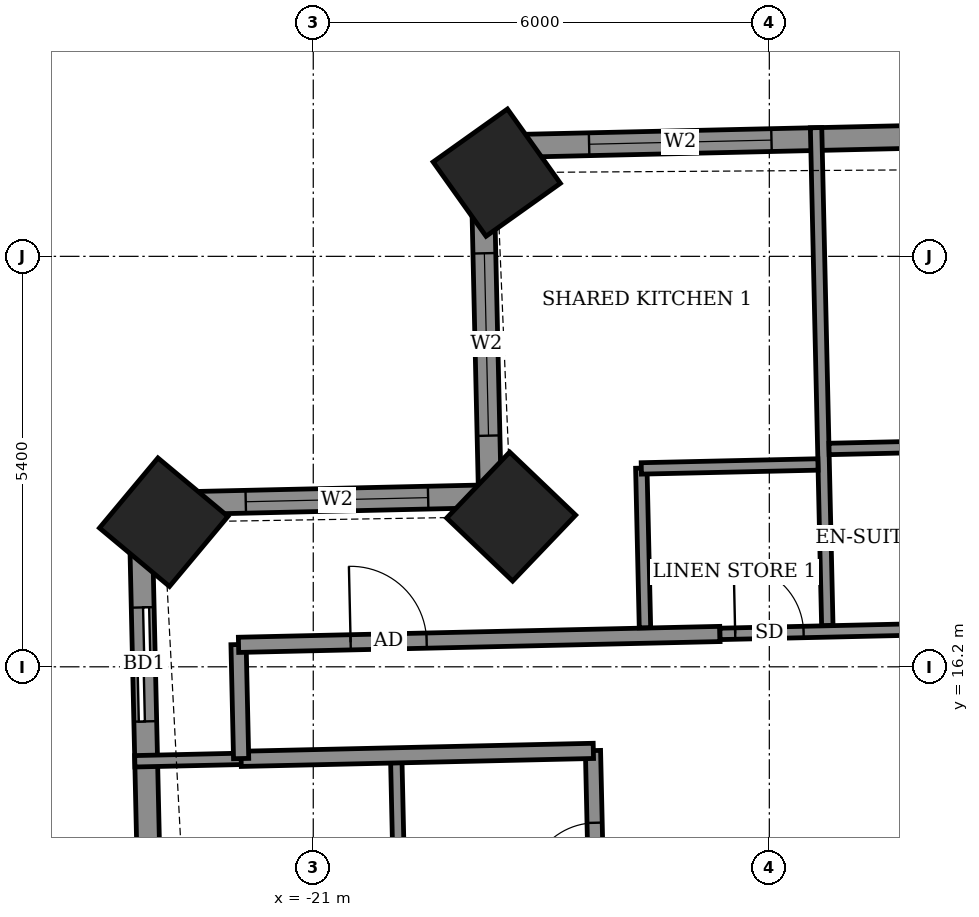
"""IFC4 building model, lengths in metres.
Left out: names, types, materials, properties, quantities, classifications, styles, units other than length and angle.
Written with IfcOpenShell. Run it as: python <this file> out.ifc"""

import sys

from ifc_helpers import new_model, si_unit, direction, frame, frame_2d, origin, origin_2d, place, context, subcontext, project, spatial, rectangle, extrude, element, fill, save


model = new_model("IFC4")
c1 = context("Model", 3, precision=1e-05, world=origin(), true_north=direction((0.0, 1.0)))
c2 = subcontext(c1, "Body", "Model", "MODEL_VIEW")
j1 = project(units=[si_unit("LENGTHUNIT", "METRE"), si_unit("PLANEANGLEUNIT", "RADIAN")], contexts=[c1])
p1 = place(None, origin())
s1 = spatial("IfcSite", under=j1, at=p1, CompositionType="ELEMENT")
p2 = place(p1, origin())
s2 = spatial("IfcBuilding", under=s1, at=p2, CompositionType="ELEMENT")
p3 = place(p2, frame((0.0, 0.0, 182.5)))
s3 = spatial("IfcBuildingStorey", under=s2, at=p3, CompositionType="ELEMENT", Elevation=182.5)
for number, where, z_axis, x_axis in (
    (1, (-18.586, 22.701, -0.55), (0.0, 0.0, 1.0), (-0.815, -0.58, 0.0)),
    (2, (-18.396, 18.177, -0.55), (0.0, 0.0, 1.0), (-0.691, -0.723, 0.0)),
    (3, (-22.968, 18.103, -0.55), (0.0, 0.0, 1.0), (-0.641, -0.768, 0.0)),
):
    element("IfcColumn", number, at=place(p3, frame(where, z_axis=z_axis, x_axis=x_axis)), inside=s3, PredefinedType="COLUMN", context=c2, shape_type="SweptSolid", body=[
        extrude(rectangle(XDim=1.2, YDim=1.2, at=origin_2d()), origin(), (0.0, 0.0, 1.0), 3.6),
    ])
p4 = place(p3, frame((21.589, 23.959, 0.0), z_axis=(0.0, 0.0, 1.0), x_axis=(-0.999742671382, -0.022684598702, 0.0)))
e4 = element("IfcWall", 4, at=p4, inside=s3, PredefinedType="SOLIDWALL", context=c2, shape_type="SweptSolid", body=[
    extrude(rectangle(XDim=40.381, YDim=0.3, at=frame_2d((20.19, 0.0))), origin(), (0.0, 0.0, 1.0), 3.05),
])
p5 = place(p4, frame((1.853, 0.0, 0.0)))
e5 = element("IfcOpeningElement", 5, at=p5, cuts=e4, PredefinedType="OPENING", context=c2, shape_type="SweptSolid", body=[
    extrude(rectangle(XDim=1.5, YDim=2.4, at=frame_2d((0.75, 1.2))), frame((0.0, 0.16, 0.0), z_axis=(0.0, -1.0, 0.0), x_axis=(1.0, 0.0, 0.0)), (0.0, 0.0, 1.0), 0.32),
])
p6 = place(p4, frame((7.38, 0.0, 0.0)))
e6 = element("IfcOpeningElement", 6, at=p6, cuts=e4, PredefinedType="OPENING", context=c2, shape_type="SweptSolid", body=[
    extrude(rectangle(XDim=1.2, YDim=2.4, at=frame_2d((0.6, 1.2))), frame((0.0, 0.16, 0.0), z_axis=(0.0, -1.0, 0.0), x_axis=(1.0, 0.0, 0.0)), (0.0, 0.0, 1.0), 0.32),
])
p7 = place(p4, frame((10.27, 0.0, 0.0)))
e7 = element("IfcOpeningElement", 7, at=p7, cuts=e4, PredefinedType="OPENING", context=c2, shape_type="SweptSolid", body=[
    extrude(rectangle(XDim=1.5, YDim=2.4, at=frame_2d((0.75, 1.2))), frame((0.0, 0.16, 0.0), z_axis=(0.0, -1.0, 0.0), x_axis=(1.0, 0.0, 0.0)), (0.0, 0.0, 1.0), 0.32),
])
p8 = place(p4, frame((15.095, 0.0, 0.0)))
e8 = element("IfcOpeningElement", 8, at=p8, cuts=e4, PredefinedType="OPENING", context=c2, shape_type="SweptSolid", body=[
    extrude(rectangle(XDim=1.5, YDim=2.4, at=frame_2d((0.75, 1.2))), frame((0.0, 0.16, 0.0), z_axis=(0.0, -1.0, 0.0), x_axis=(1.0, 0.0, 0.0)), (0.0, 0.0, 1.0), 0.32),
])
p9 = place(p4, frame((20.935, 0.0, 0.0)))
e9 = element("IfcOpeningElement", 9, at=p9, cuts=e4, PredefinedType="OPENING", context=c2, shape_type="SweptSolid", body=[
    extrude(rectangle(XDim=1.2, YDim=2.4, at=frame_2d((0.6, 1.2))), frame((0.0, 0.16, 0.0), z_axis=(0.0, -1.0, 0.0), x_axis=(1.0, 0.0, 0.0)), (0.0, 0.0, 1.0), 0.32),
])
p10 = place(p4, frame((23.825, 0.0, 0.0)))
e10 = element("IfcOpeningElement", 10, at=p10, cuts=e4, PredefinedType="OPENING", context=c2, shape_type="SweptSolid", body=[
    extrude(rectangle(XDim=1.5, YDim=2.4, at=frame_2d((0.75, 1.2))), frame((0.0, 0.16, 0.0), z_axis=(0.0, -1.0, 0.0), x_axis=(1.0, 0.0, 0.0)), (0.0, 0.0, 1.0), 0.32),
])
p11 = place(p4, frame((28.65, 0.0, 0.0)))
e11 = element("IfcOpeningElement", 11, at=p11, cuts=e4, PredefinedType="OPENING", context=c2, shape_type="SweptSolid", body=[
    extrude(rectangle(XDim=1.5, YDim=2.4, at=frame_2d((0.75, 1.2))), frame((0.0, 0.16, 0.0), z_axis=(0.0, -1.0, 0.0), x_axis=(1.0, 0.0, 0.0)), (0.0, 0.0, 1.0), 0.32),
])
p12 = place(p4, frame((31.84, 0.0, 0.0)))
e12 = element("IfcOpeningElement", 12, at=p12, cuts=e4, PredefinedType="OPENING", context=c2, shape_type="SweptSolid", body=[
    extrude(rectangle(XDim=1.2, YDim=2.4, at=frame_2d((0.6, 1.2))), frame((0.0, 0.16, 0.0), z_axis=(0.0, -1.0, 0.0), x_axis=(1.0, 0.0, 0.0)), (0.0, 0.0, 1.0), 0.32),
])
p13 = place(p4, frame((36.57, 0.0, 0.9)))
e13 = element("IfcOpeningElement", 13, at=p13, cuts=e4, PredefinedType="OPENING", context=c2, shape_type="SweptSolid", body=[
    extrude(rectangle(XDim=2.4, YDim=1.5, at=frame_2d((1.2, 0.75))), frame((0.0, 0.16, 0.0), z_axis=(0.0, -1.0, 0.0), x_axis=(1.0, 0.0, 0.0)), (0.0, 0.0, 1.0), 0.32),
])
p14 = place(p3, frame((-18.781, 23.043, 0.0), z_axis=(0.0, 0.0, 1.0), x_axis=(0.022821468877, -0.999739556364, 0.0)))
e14 = element("IfcWall", 14, at=p14, inside=s3, PredefinedType="SOLIDWALL", context=c2, shape_type="SweptSolid", body=[
    extrude(rectangle(XDim=4.6, YDim=0.3, at=frame_2d((2.3, 0.0))), origin(), (0.0, 0.0, 1.0), 2.55),
])
p15 = place(p14, frame((1.403, 0.0, 0.9)))
e15 = element("IfcOpeningElement", 15, at=p15, cuts=e14, PredefinedType="OPENING", context=c2, shape_type="SweptSolid", body=[
    extrude(rectangle(XDim=2.4, YDim=1.5, at=frame_2d((1.2, 0.75))), frame((0.0, 0.16, 0.0), z_axis=(0.0, -1.0, 0.0), x_axis=(1.0, 0.0, 0.0)), (0.0, 0.0, 1.0), 0.32),
])
p16 = place(p3, frame((-18.676, 18.444, 0.0), z_axis=(0.0, 0.0, 1.0), x_axis=(-0.999744377441, -0.022609285172, 0.0)))
e16 = element("IfcWall", 16, at=p16, inside=s3, PredefinedType="SOLIDWALL", context=c2, shape_type="SweptSolid", body=[
    extrude(rectangle(XDim=4.6, YDim=0.3, at=frame_2d((2.3, 0.0))), origin(), (0.0, 0.0, 1.0), 2.55),
])
p17 = place(p16, frame((0.813, 0.0, 0.9)))
e17 = element("IfcOpeningElement", 17, at=p17, cuts=e16, PredefinedType="OPENING", context=c2, shape_type="SweptSolid", body=[
    extrude(rectangle(XDim=2.4, YDim=1.5, at=frame_2d((1.2, 0.75))), frame((0.0, 0.16, 0.0), z_axis=(0.0, -1.0, 0.0), x_axis=(1.0, 0.0, 0.0)), (0.0, 0.0, 1.0), 0.32),
])
p18 = place(p3, frame((-23.275, 18.34, 0.0), z_axis=(0.0, 0.0, 1.0), x_axis=(0.022705985163, -0.999742185885, 0.0)))
e18 = element("IfcWall", 18, at=p18, inside=s3, PredefinedType="SOLIDWALL", context=c2, shape_type="SweptSolid", body=[
    extrude(rectangle(XDim=10.43, YDim=0.3, at=frame_2d((5.215, 0.0))), origin(), (0.0, 0.0, 1.0), 3.05),
])
p19 = place(p18, frame((1.359, 0.0, 0.0)))
e19 = element("IfcOpeningElement", 19, at=p19, cuts=e18, PredefinedType="OPENING", context=c2, shape_type="SweptSolid", body=[
    extrude(rectangle(XDim=1.5, YDim=2.4, at=frame_2d((0.75, 1.2))), frame((0.0, 0.16, 0.0), z_axis=(0.0, -1.0, 0.0), x_axis=(1.0, 0.0, 0.0)), (0.0, 0.0, 1.0), 0.32),
])
p20 = place(p18, frame((6.543, 0.0, 0.9)))
e20 = element("IfcOpeningElement", 20, at=p20, cuts=e18, PredefinedType="OPENING", context=c2, shape_type="SweptSolid", body=[
    extrude(rectangle(XDim=2.4, YDim=1.5, at=frame_2d((1.2, 0.75))), frame((0.0, 0.16, 0.0), z_axis=(0.0, -1.0, 0.0), x_axis=(1.0, 0.0, 0.0)), (0.0, 0.0, 1.0), 0.32),
])
p21 = place(p3, frame((-16.684, -12.919, 0.0), z_axis=(0.0, 0.0, 1.0), x_axis=(-0.022694293906, 0.999742451346, 0.0)))
e21 = element("IfcWall", 21, at=p21, inside=s3, PredefinedType="PARTITIONING", context=c2, shape_type="SweptSolid", body=[
    extrude(rectangle(XDim=28.024, YDim=0.2, at=frame_2d((14.012, 0.0))), origin(), (0.0, 0.0, 1.0), 3.05),
])
p22 = place(p21, frame((22.625, 0.0, 0.0)))
e22 = element("IfcOpeningElement", 22, at=p22, cuts=e21, PredefinedType="OPENING", context=c2, shape_type="SweptSolid", body=[
    extrude(rectangle(XDim=1.0, YDim=2.1, at=frame_2d((0.5, 1.05))), frame((0.0, 0.11, 0.0), z_axis=(0.0, -1.0, 0.0), x_axis=(1.0, 0.0, 0.0)), (0.0, 0.0, 1.0), 0.22),
])
p23 = place(p21, frame((26.174, 0.0, 0.0)))
e23 = element("IfcOpeningElement", 23, at=p23, cuts=e21, PredefinedType="OPENING", context=c2, shape_type="SweptSolid", body=[
    extrude(rectangle(XDim=0.9, YDim=2.1, at=frame_2d((0.45, 1.05))), frame((0.0, 0.11, 0.0), z_axis=(0.0, -1.0, 0.0), x_axis=(1.0, 0.0, 0.0)), (0.0, 0.0, 1.0), 0.22),
])
p24 = place(p21, frame((16.432, 0.0, 0.0)))
e24 = element("IfcOpeningElement", 24, at=p24, cuts=e21, PredefinedType="OPENING", context=c2, shape_type="SweptSolid", body=[
    extrude(rectangle(XDim=1.0, YDim=2.1, at=frame_2d((0.5, 1.05))), frame((0.0, 0.11, 0.0), z_axis=(0.0, -1.0, 0.0), x_axis=(1.0, 0.0, 0.0)), (0.0, 0.0, 1.0), 0.22),
])
p25 = place(p21, frame((10.975, 0.0, 0.0)))
e25 = element("IfcOpeningElement", 25, at=p25, cuts=e21, PredefinedType="OPENING", context=c2, shape_type="SweptSolid", body=[
    extrude(rectangle(XDim=1.0, YDim=2.1, at=frame_2d((0.5, 1.05))), frame((0.0, 0.11, 0.0), z_axis=(0.0, -1.0, 0.0), x_axis=(1.0, 0.0, 0.0)), (0.0, 0.0, 1.0), 0.22),
])
p26 = place(p21, frame((8.025, 0.0, 0.0)))
e26 = element("IfcOpeningElement", 26, at=p26, cuts=e21, PredefinedType="OPENING", context=c2, shape_type="SweptSolid", body=[
    extrude(rectangle(XDim=0.9, YDim=2.1, at=frame_2d((0.45, 1.05))), frame((0.0, 0.11, 0.0), z_axis=(0.0, -1.0, 0.0), x_axis=(1.0, 0.0, 0.0)), (0.0, 0.0, 1.0), 0.22),
])
p27 = place(p21, frame((5.113, 0.0, 0.0)))
e27 = element("IfcOpeningElement", 27, at=p27, cuts=e21, PredefinedType="OPENING", context=c2, shape_type="SweptSolid", body=[
    extrude(rectangle(XDim=1.0, YDim=2.1, at=frame_2d((0.5, 1.05))), frame((0.0, 0.11, 0.0), z_axis=(0.0, -1.0, 0.0), x_axis=(1.0, 0.0, 0.0)), (0.0, 0.0, 1.0), 0.22),
])
p28 = place(p3, frame((-19.846, 12.24, 0.0), z_axis=(0.0, 0.0, 1.0), x_axis=(-0.02260842146, 0.999744396973, 0.0)))
e28 = element("IfcWall", 28, at=p28, inside=s3, PredefinedType="PARTITIONING", context=c2, shape_type="SweptSolid", body=[
    extrude(rectangle(XDim=2.7, YDim=0.15, at=frame_2d((1.35, 0.0))), origin(), (0.0, 0.0, 1.0), 3.05),
])
p29 = place(p3, frame((-23.348, 14.957, 0.0), z_axis=(0.0, 0.0, 1.0), x_axis=(0.999740216184, 0.022792545827, 0.0)))
e29 = element("IfcWall", 29, at=p29, inside=s3, PredefinedType="PARTITIONING", context=c2, shape_type="SweptSolid", body=[
    extrude(rectangle(XDim=1.403, YDim=0.15, at=frame_2d((0.702, 0.0))), origin(), (0.0, 0.0, 1.0), 2.55),
])
p30 = place(p3, frame((-21.949, 14.989, 0.0), z_axis=(0.0, 0.0, 1.0), x_axis=(0.999743491588, 0.022648422179, 0.0)))
e30 = element("IfcWall", 30, at=p30, inside=s3, PredefinedType="PARTITIONING", context=c2, shape_type="SweptSolid", body=[
    extrude(rectangle(XDim=4.635, YDim=0.2, at=frame_2d((2.318, 0.0))), origin(), (0.0, 0.0, 1.0), 3.05),
])
p31 = place(p3, frame((-21.949, 14.993, 0.0), z_axis=(0.0, 0.0, 1.0), x_axis=(-0.022617910375, 0.999744182344, 0.0)))
e31 = element("IfcWall", 31, at=p31, inside=s3, PredefinedType="PARTITIONING", context=c2, shape_type="SweptSolid", body=[
    extrude(rectangle(XDim=1.5, YDim=0.2, at=frame_2d((0.75, 0.0))), origin(), (0.0, 0.0, 1.0), 3.05),
])
p32 = place(p3, frame((-21.983, 16.489, 0.0), z_axis=(0.0, 0.0, 1.0), x_axis=(0.999744930163, 0.022584831499, 0.0)))
e32 = element("IfcWall", 32, at=p32, inside=s3, PredefinedType="PARTITIONING", context=c2, shape_type="SweptSolid", body=[
    extrude(rectangle(XDim=6.335, YDim=0.2, at=frame_2d((3.167, 0.0))), origin(), (0.0, 0.0, 1.0), 3.05),
])
p33 = place(p32, frame((1.475, 0.0, 0.0)))
e33 = element("IfcOpeningElement", 33, at=p33, cuts=e32, PredefinedType="OPENING", context=c2, shape_type="SweptSolid", body=[
    extrude(rectangle(XDim=1.0, YDim=2.1, at=frame_2d((0.5, 1.05))), frame((0.0, 0.11, 0.0), z_axis=(0.0, -1.0, 0.0), x_axis=(1.0, 0.0, 0.0)), (0.0, 0.0, 1.0), 0.22),
])
p34 = place(p3, frame((-15.649, 16.633, 0.0), z_axis=(0.0, 0.0, 1.0), x_axis=(0.999743261737, 0.022658565952, 0.0)))
e34 = element("IfcWall", 34, at=p34, inside=s3, PredefinedType="PARTITIONING", context=c2, shape_type="SweptSolid", body=[
    extrude(rectangle(XDim=30.536, YDim=0.15, at=frame_2d((15.268, 0.0))), origin(), (0.0, 0.0, 1.0), 3.05),
])
p35 = place(p34, frame((24.44, 0.0, 0.0)))
e35 = element("IfcOpeningElement", 35, at=p35, cuts=e34, PredefinedType="OPENING", context=c2, shape_type="SweptSolid", body=[
    extrude(rectangle(XDim=0.9, YDim=2.1, at=frame_2d((0.45, 1.05))), frame((0.0, 0.085, 0.0), z_axis=(0.0, -1.0, 0.0), x_axis=(1.0, 0.0, 0.0)), (0.0, 0.0, 1.0), 0.17),
])
p36 = place(p34, frame((22.365, 0.0, 0.0)))
e36 = element("IfcOpeningElement", 36, at=p36, cuts=e34, PredefinedType="OPENING", context=c2, shape_type="SweptSolid", body=[
    extrude(rectangle(XDim=0.9, YDim=2.1, at=frame_2d((0.45, 1.05))), frame((0.0, 0.085, 0.0), z_axis=(0.0, -1.0, 0.0), x_axis=(1.0, 0.0, 0.0)), (0.0, 0.0, 1.0), 0.17),
])
p37 = place(p34, frame((15.515, 0.0, 0.0)))
e37 = element("IfcOpeningElement", 37, at=p37, cuts=e34, PredefinedType="OPENING", context=c2, shape_type="SweptSolid", body=[
    extrude(rectangle(XDim=0.9, YDim=2.1, at=frame_2d((0.45, 1.05))), frame((0.0, 0.085, 0.0), z_axis=(0.0, -1.0, 0.0), x_axis=(1.0, 0.0, 0.0)), (0.0, 0.0, 1.0), 0.17),
])
p38 = place(p34, frame((13.44, 0.0, 0.0)))
e38 = element("IfcOpeningElement", 38, at=p38, cuts=e34, PredefinedType="OPENING", context=c2, shape_type="SweptSolid", body=[
    extrude(rectangle(XDim=0.9, YDim=2.1, at=frame_2d((0.45, 1.05))), frame((0.0, 0.085, 0.0), z_axis=(0.0, -1.0, 0.0), x_axis=(1.0, 0.0, 0.0)), (0.0, 0.0, 1.0), 0.17),
])
p39 = place(p34, frame((6.565, 0.0, 0.0)))
e39 = element("IfcOpeningElement", 39, at=p39, cuts=e34, PredefinedType="OPENING", context=c2, shape_type="SweptSolid", body=[
    extrude(rectangle(XDim=0.9, YDim=2.1, at=frame_2d((0.45, 1.05))), frame((0.0, 0.085, 0.0), z_axis=(0.0, -1.0, 0.0), x_axis=(1.0, 0.0, 0.0)), (0.0, 0.0, 1.0), 0.17),
])
p40 = place(p34, frame((4.415, 0.0, 0.0)))
e40 = element("IfcOpeningElement", 40, at=p40, cuts=e34, PredefinedType="OPENING", context=c2, shape_type="SweptSolid", body=[
    extrude(rectangle(XDim=0.9, YDim=2.1, at=frame_2d((0.45, 1.05))), frame((0.0, 0.085, 0.0), z_axis=(0.0, -1.0, 0.0), x_axis=(1.0, 0.0, 0.0)), (0.0, 0.0, 1.0), 0.17),
])
p41 = place(p34, frame((0.2, 0.0, 0.0)))
e41 = element("IfcOpeningElement", 41, at=p41, cuts=e34, PredefinedType="OPENING", context=c2, shape_type="SweptSolid", body=[
    extrude(rectangle(XDim=0.9, YDim=2.1, at=frame_2d((0.45, 1.05))), frame((0.0, 0.085, 0.0), z_axis=(0.0, -1.0, 0.0), x_axis=(1.0, 0.0, 0.0)), (0.0, 0.0, 1.0), 0.17),
])
p42 = place(p3, frame((-16.636, 16.714, 0.0), z_axis=(0.0, 0.0, 1.0), x_axis=(-0.022898307927, 0.999737799372, 0.0)))
e42 = element("IfcWall", 42, at=p42, inside=s3, PredefinedType="PARTITIONING", context=c2, shape_type="SweptSolid", body=[
    extrude(rectangle(XDim=2.1, YDim=0.15, at=frame_2d((1.05, 0.0))), origin(), (0.0, 0.0, 1.0), 3.05),
])
p43 = place(p3, frame((-14.237, 16.744, 0.0), z_axis=(0.0, 0.0, 1.0), x_axis=(-0.022585104341, 0.999744923999, 0.0)))
e43 = element("IfcWall", 43, at=p43, inside=s3, PredefinedType="PARTITIONING", context=c2, shape_type="SweptSolid", body=[
    extrude(rectangle(XDim=6.551, YDim=0.15, at=frame_2d((3.275, 0.0))), origin(), (0.0, 0.0, 1.0), 2.55),
])
p44 = place(p3, frame((-16.684, 18.81, 0.0), z_axis=(0.0, 0.0, 1.0), x_axis=(0.999749744571, 0.022370700241, 0.0)))
e44 = element("IfcWall", 44, at=p44, inside=s3, PredefinedType="PARTITIONING", context=c2, shape_type="SweptSolid", body=[
    extrude(rectangle(XDim=2.324, YDim=0.15, at=frame_2d((1.162, 0.0))), origin(), (0.0, 0.0, 1.0), 3.05),
])
p45 = place(p3, frame((-14.214, 19.066, 0.0), z_axis=(0.0, 0.0, 1.0), x_axis=(0.999749797124, 0.022368351553, 0.0)))
e45 = element("IfcWall", 45, at=p45, inside=s3, PredefinedType="PARTITIONING", context=c2, shape_type="SweptSolid", body=[
    extrude(rectangle(XDim=2.325, YDim=0.15, at=frame_2d((1.162, 0.0))), origin(), (0.0, 0.0, 1.0), 3.05),
])
p46 = place(p13, origin())
e46 = element("IfcWindow", 46, at=p46, inside=s3, PartitioningType="DOUBLE_PANEL_VERTICAL", PredefinedType="WINDOW", context=c2, shape_type="SweptSolid", body=[
    extrude(rectangle(XDim=2.4, YDim=1.5, at=frame_2d((1.2, 0.75))), frame((0.0, 0.03, 0.0), z_axis=(0.0, -1.0, 0.0), x_axis=(1.0, 0.0, 0.0)), (0.0, 0.0, 1.0), 0.06),
])
fill(e13, e46)
p47 = place(p15, origin())
e47 = element("IfcWindow", 47, at=p47, inside=s3, PartitioningType="DOUBLE_PANEL_VERTICAL", PredefinedType="WINDOW", context=c2, shape_type="SweptSolid", body=[
    extrude(rectangle(XDim=2.4, YDim=1.5, at=frame_2d((1.2, 0.75))), frame((0.0, 0.03, 0.0), z_axis=(0.0, -1.0, 0.0), x_axis=(1.0, 0.0, 0.0)), (0.0, 0.0, 1.0), 0.06),
])
fill(e15, e47)
p48 = place(p17, origin())
e48 = element("IfcWindow", 48, at=p48, inside=s3, PartitioningType="DOUBLE_PANEL_VERTICAL", PredefinedType="WINDOW", context=c2, shape_type="SweptSolid", body=[
    extrude(rectangle(XDim=2.4, YDim=1.5, at=frame_2d((1.2, 0.75))), frame((0.0, 0.03, 0.0), z_axis=(0.0, -1.0, 0.0), x_axis=(1.0, 0.0, 0.0)), (0.0, 0.0, 1.0), 0.06),
])
fill(e17, e48)
p49 = place(p19, origin())
e49 = element("IfcDoor", 49, at=p49, inside=s3, OperationType="SLIDING_TO_LEFT", PredefinedType="DOOR", context=c2, shape_type="SweptSolid", body=[
    extrude(rectangle(XDim=1.5, YDim=2.4, at=frame_2d((0.75, 1.2))), frame((0.0, 0.025, 0.0), z_axis=(0.0, -1.0, 0.0), x_axis=(1.0, 0.0, 0.0)), (0.0, 0.0, 1.0), 0.05),
])
fill(e19, e49)
p50 = place(p33, origin())
e50 = element("IfcDoor", 50, at=p50, inside=s3, OperationType="SINGLE_SWING_RIGHT", PredefinedType="DOOR", context=c2, shape_type="SweptSolid", body=[
    extrude(rectangle(XDim=1.0, YDim=2.1, at=frame_2d((0.5, 1.05))), frame((0.0, 0.025, 0.0), z_axis=(0.0, -1.0, 0.0), x_axis=(1.0, 0.0, 0.0)), (0.0, 0.0, 1.0), 0.05),
])
fill(e33, e50)
p51 = place(p41, origin())
e51 = element("IfcDoor", 51, at=p51, inside=s3, OperationType="SINGLE_SWING_RIGHT", PredefinedType="DOOR", context=c2, shape_type="SweptSolid", body=[
    extrude(rectangle(XDim=0.9, YDim=2.1, at=frame_2d((0.45, 1.05))), frame((0.0, 0.025, 0.0), z_axis=(0.0, -1.0, 0.0), x_axis=(1.0, 0.0, 0.0)), (0.0, 0.0, 1.0), 0.05),
])
fill(e41, e51)
p52 = place(p23, origin())
e52 = element("IfcDoor", 52, at=p52, inside=s3, OperationType="SINGLE_SWING_LEFT", PredefinedType="DOOR", context=c2, shape_type="SweptSolid", body=[
    extrude(rectangle(XDim=0.9, YDim=2.1, at=frame_2d((0.45, 1.05))), frame((0.0, 0.025, 0.0), z_axis=(0.0, -1.0, 0.0), x_axis=(1.0, 0.0, 0.0)), (0.0, 0.0, 1.0), 0.05),
])
fill(e23, e52)
save(model, sys.argv[1])
